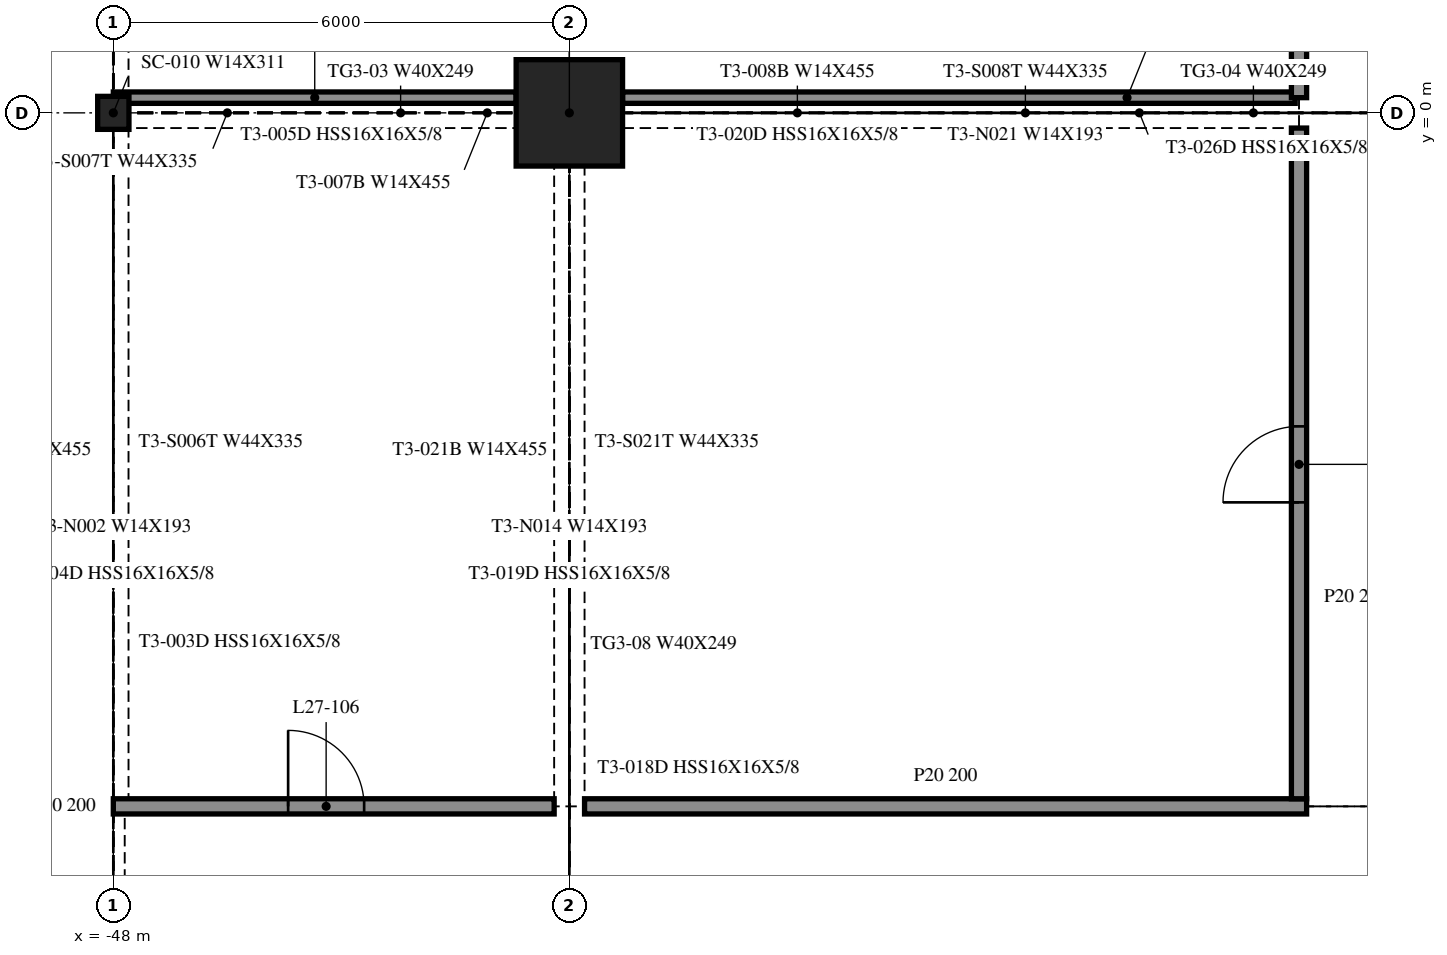
"""IFC4 building model, lengths in metres.
Left out: names, types, materials, properties, quantities, classifications, styles, units other than length and angle.
Written with IfcOpenShell. Run it as: python <this file> out.ifc"""

import sys

from ifc_helpers import new_model, si_unit, direction, frame, frame_2d, origin, origin_2d, place, context, subcontext, project, spatial, rectangle, i_section, extrude, element, fill, save


model = new_model("IFC4")
c1 = context("Model", 3, precision=1e-05, world=origin(), true_north=direction((0.0, 1.0)))
c2 = subcontext(c1, "Body", "Model", "MODEL_VIEW")
j1 = project(units=[si_unit("LENGTHUNIT", "METRE"), si_unit("PLANEANGLEUNIT", "RADIAN")], contexts=[c1])
p1 = place(None, origin())
s1 = spatial("IfcSite", under=j1, at=p1, CompositionType="ELEMENT")
p2 = place(p1, origin())
s2 = spatial("IfcBuilding", under=s1, at=p2, CompositionType="ELEMENT")
p3 = place(p2, frame((0.0, 0.0, 117.6)))
s3 = spatial("IfcBuildingStorey", under=s2, at=p3, CompositionType="ELEMENT", Elevation=117.6)
p4 = place(p3, frame((-42.0, 0.0, -0.55), z_axis=(0.0, 0.0, 1.0), x_axis=(1.0, 0.0, 0.0)))
e1 = element("IfcColumn", 1, at=p4, inside=s3, PredefinedType="COLUMN", context=c2, shape_type="SweptSolid", body=[
    extrude(rectangle(XDim=1.4, YDim=1.4, at=origin_2d()), origin(), (0.0, 0.0, 1.0), 4.61),
])
p5 = place(p3, frame((-48.0, 0.0, -0.55), z_axis=(0.0, 0.0, 1.0), x_axis=(1.0, 0.0, 0.0)))
e2 = element("IfcColumn", 2, at=p5, inside=s3, PredefinedType="COLUMN", context=c2, shape_type="SweptSolid", body=[
    extrude(i_section(OverallWidth=0.412, OverallDepth=0.434, WebThickness=0.036, FlangeThickness=0.057, at=origin_2d()), origin(), (0.0, 0.0, 1.0), 4.61),
])
p6 = place(p3, frame((-48.0, -9.125, 0.0), z_axis=(0.0, 0.0, 1.0), x_axis=(1.0, 0.0, 0.0)))
e3 = element("IfcWall", 3, at=p6, inside=s3, PredefinedType="PARTITIONING", context=c2, shape_type="SweptSolid", body=[
    extrude(rectangle(XDim=5.8, YDim=0.2, at=frame_2d((2.9, 0.0))), origin(), (0.0, 0.0, 1.0), 4.06),
])
p7 = place(p6, frame((2.3, 0.0, 0.0)))
e4 = element("IfcOpeningElement", 4, at=p7, cuts=e3, PredefinedType="OPENING", context=c2, shape_type="SweptSolid", body=[
    extrude(rectangle(XDim=1.0, YDim=2.1, at=frame_2d((0.5, 1.05))), frame((0.0, 0.11, 0.0), z_axis=(0.0, -1.0, 0.0), x_axis=(1.0, 0.0, 0.0)), (0.0, 0.0, 1.0), 0.22),
])
p8 = place(p3, frame((-41.8, -9.125, 0.0), z_axis=(0.0, 0.0, 1.0), x_axis=(1.0, 0.0, 0.0)))
e5 = element("IfcWall", 5, at=p8, inside=s3, PredefinedType="PARTITIONING", context=c2, shape_type="SweptSolid", body=[
    extrude(rectangle(XDim=9.5, YDim=0.2, at=frame_2d((4.75, 0.0))), origin(), (0.0, 0.0, 1.0), 4.06),
])
p9 = place(p3, frame((-48.0, 0.2, 0.0), z_axis=(0.0, 0.0, 1.0), x_axis=(1.0, 0.0, 0.0)))
e6 = element("IfcWall", 6, at=p9, inside=s3, PredefinedType="PARTITIONING", context=c2, shape_type="SweptSolid", body=[
    extrude(rectangle(XDim=5.3, YDim=0.15, at=frame_2d((2.65, 0.0))), origin(), (0.0, 0.0, 1.0), 4.06),
])
p10 = place(p3, frame((-41.3, 0.2, 0.0), z_axis=(0.0, 0.0, 1.0), x_axis=(1.0, 0.0, 0.0)))
e7 = element("IfcWall", 7, at=p10, inside=s3, PredefinedType="PARTITIONING", context=c2, shape_type="SweptSolid", body=[
    extrude(rectangle(XDim=8.85, YDim=0.15, at=frame_2d((4.425, 0.0))), origin(), (0.0, 0.0, 1.0), 4.06),
])
p11 = place(p3, frame((-32.4, -9.025, 0.0), z_axis=(0.0, 0.0, 1.0), x_axis=(0.0, 1.0, 0.0)))
e8 = element("IfcWall", 8, at=p11, inside=s3, PredefinedType="PARTITIONING", context=c2, shape_type="SweptSolid", body=[
    extrude(rectangle(XDim=8.825, YDim=0.2, at=frame_2d((4.413, 0.0))), origin(), (0.0, 0.0, 1.0), 4.06),
])
p12 = place(p11, frame((3.9, 0.0, 0.0)))
e9 = element("IfcOpeningElement", 9, at=p12, cuts=e8, PredefinedType="OPENING", context=c2, shape_type="SweptSolid", body=[
    extrude(rectangle(XDim=1.0, YDim=2.1, at=frame_2d((0.5, 1.05))), frame((0.0, 0.11, 0.0), z_axis=(0.0, -1.0, 0.0), x_axis=(1.0, 0.0, 0.0)), (0.0, 0.0, 1.0), 0.22),
])
p13 = place(p3, frame((-32.4, 0.2, 0.0), z_axis=(0.0, 0.0, 1.0), x_axis=(0.0, 1.0, 0.0)))
e10 = element("IfcWall", 10, at=p13, inside=s3, PredefinedType="PARTITIONING", context=c2, shape_type="SweptSolid", body=[
    extrude(rectangle(XDim=11.1, YDim=0.2, at=frame_2d((5.55, 0.0))), origin(), (0.0, 0.0, 1.0), 4.06),
])
p14 = place(p13, frame((4.9, 0.0, 0.0)))
e11 = element("IfcOpeningElement", 11, at=p14, cuts=e10, PredefinedType="OPENING", context=c2, shape_type="SweptSolid", body=[
    extrude(rectangle(XDim=1.2, YDim=2.1, at=frame_2d((0.6, 1.05))), frame((0.0, 0.11, 0.0), z_axis=(0.0, -1.0, 0.0), x_axis=(1.0, 0.0, 0.0)), (0.0, 0.0, 1.0), 0.22),
])
p15 = place(p7, origin())
e12 = element("IfcDoor", 12, at=p15, inside=s3, OperationType="SINGLE_SWING_LEFT", PredefinedType="DOOR", context=c2, shape_type="SweptSolid", body=[
    extrude(rectangle(XDim=1.0, YDim=2.1, at=frame_2d((0.5, 1.05))), frame((0.0, 0.025, 0.0), z_axis=(0.0, -1.0, 0.0), x_axis=(1.0, 0.0, 0.0)), (0.0, 0.0, 1.0), 0.05),
])
fill(e4, e12)
p16 = place(p12, origin())
e13 = element("IfcDoor", 13, at=p16, inside=s3, OperationType="SINGLE_SWING_LEFT", PredefinedType="DOOR", context=c2, shape_type="SweptSolid", body=[
    extrude(rectangle(XDim=1.0, YDim=2.1, at=frame_2d((0.5, 1.05))), frame((0.0, 0.025, 0.0), z_axis=(0.0, -1.0, 0.0), x_axis=(1.0, 0.0, 0.0)), (0.0, 0.0, 1.0), 0.05),
])
fill(e9, e13)
save(model, sys.argv[1])
